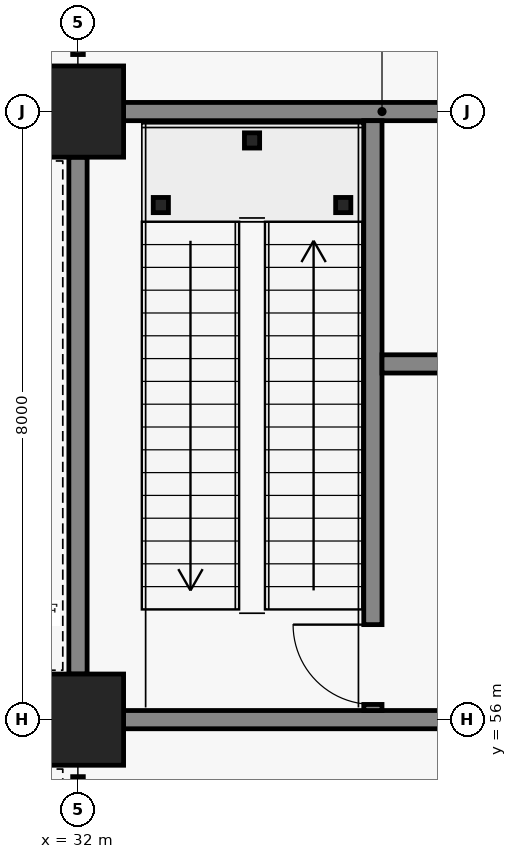
"""IFC4 building model, lengths in metres.
Left out: names, types, materials, properties, quantities, classifications, styles, units other than length and angle.
Written with IfcOpenShell. Run it as: python <this file> out.ifc"""

import sys

from ifc_helpers import new_model, si_unit, direction, frame, frame_2d, origin, origin_2d, place, context, subcontext, project, spatial, rectangle, hollow_rectangle, extrude, element, fill, save


model = new_model("IFC4")
c1 = context("Model", 3, precision=1e-05, world=origin(), true_north=direction((0.0, 1.0)))
c2 = subcontext(c1, "Body", "Model", "MODEL_VIEW")
j1 = project(units=[si_unit("LENGTHUNIT", "METRE"), si_unit("PLANEANGLEUNIT", "RADIAN")], contexts=[c1])
p1 = place(None, origin())
s1 = spatial("IfcSite", under=j1, at=p1, CompositionType="ELEMENT")
p2 = place(p1, origin())
s2 = spatial("IfcBuilding", under=s1, at=p2, CompositionType="ELEMENT")
p3 = place(p2, frame((0.0, 0.0, -5.4)))
s3 = spatial("IfcBuildingStorey", under=s2, at=p3, CompositionType="ELEMENT", Elevation=-5.4)
for number, where, z_axis, x_axis in (
    (1, (32.0, 56.0, 0.0), (0.0, 0.0, 1.0), (1.0, 0.0, 0.0)),
    (2, (32.0, 64.0, 0.0), (0.0, 0.0, 1.0), (1.0, 0.0, 0.0)),
):
    element("IfcColumn", number, at=place(p3, frame(where, z_axis=z_axis, x_axis=x_axis)), inside=s3, PredefinedType="COLUMN", context=c2, shape_type="SweptSolid", body=[
        extrude(rectangle(XDim=1.2, YDim=1.2, at=origin_2d()), origin(), (0.0, 0.0, 1.0), 5.4),
    ])
p4 = place(p3, frame((32.6, 56.0, 0.0), z_axis=(0.0, 0.0, 1.0), x_axis=(1.0, 0.0, 0.0)))
e3 = element("IfcWall", 3, at=p4, inside=s3, PredefinedType="SHEAR", context=c2, shape_type="SweptSolid", body=[
    extrude(rectangle(XDim=6.8, YDim=0.24, at=frame_2d((3.4, 0.0))), origin(), (0.0, 0.0, 1.0), 4.59),
])
p5 = place(p4, frame((4.65, 0.0, 0.0)))
e4 = element("IfcOpeningElement", 4, at=p5, cuts=e3, PredefinedType="OPENING", context=c2, shape_type="SweptSolid", body=[
    extrude(rectangle(XDim=1.1, YDim=2.2, at=frame_2d((0.55, 1.1))), frame((0.0, 0.13, 0.0), z_axis=(0.0, -1.0, 0.0), x_axis=(1.0, 0.0, 0.0)), (0.0, 0.0, 1.0), 0.26),
])
p6 = place(p3, frame((32.6, 64.0, 0.0), z_axis=(0.0, 0.0, 1.0), x_axis=(1.0, 0.0, 0.0)))
e5 = element("IfcWall", 5, at=p6, inside=s3, PredefinedType="SHEAR", context=c2, shape_type="SweptSolid", body=[
    extrude(rectangle(XDim=6.8, YDim=0.24, at=frame_2d((3.4, 0.0))), origin(), (0.0, 0.0, 1.0), 4.59),
])
p7 = place(p3, frame((32.0, 56.6, 0.0), z_axis=(0.0, 0.0, 1.0), x_axis=(0.0, 1.0, 0.0)))
e6 = element("IfcWall", 6, at=p7, inside=s3, PredefinedType="SHEAR", context=c2, shape_type="SweptSolid", body=[
    extrude(rectangle(XDim=6.8, YDim=0.24, at=frame_2d((3.4, 0.0))), origin(), (0.0, 0.0, 1.0), 4.39),
])
p8 = place(p3, frame((35.88, 56.12, 0.0), z_axis=(0.0, 0.0, 1.0), x_axis=(0.0, 1.0, 0.0)))
e7 = element("IfcWall", 7, at=p8, inside=s3, PredefinedType="SHEAR", context=c2, shape_type="SweptSolid", body=[
    extrude(rectangle(XDim=7.76, YDim=0.24, at=frame_2d((3.88, 0.0))), origin(), (0.0, 0.0, 1.0), 4.59),
])
p9 = place(p8, frame((0.08, 0.0, 0.0)))
e8 = element("IfcOpeningElement", 8, at=p9, cuts=e7, PredefinedType="OPENING", context=c2, shape_type="SweptSolid", body=[
    extrude(rectangle(XDim=1.05, YDim=2.15, at=frame_2d((0.525, 1.075))), frame((0.0, 0.13, 0.0), z_axis=(0.0, -1.0, 0.0), x_axis=(1.0, 0.0, 0.0)), (0.0, 0.0, 1.0), 0.26),
])
p10 = place(p3, frame((36.0, 60.68, 0.0), z_axis=(0.0, 0.0, 1.0), x_axis=(1.0, 0.0, 0.0)))
e9 = element("IfcWall", 9, at=p10, inside=s3, PredefinedType="SHEAR", context=c2, shape_type="SweptSolid", body=[
    extrude(rectangle(XDim=3.88, YDim=0.24, at=frame_2d((1.94, 0.0))), origin(), (0.0, 0.0, 1.0), 4.39),
])
p11 = place(p10, frame((1.0, 0.0, 0.0)))
e10 = element("IfcOpeningElement", 10, at=p11, cuts=e9, PredefinedType="OPENING", context=c2, shape_type="SweptSolid", body=[
    extrude(rectangle(XDim=1.1, YDim=2.15, at=frame_2d((0.55, 1.075))), frame((0.0, 0.13, 0.0), z_axis=(0.0, -1.0, 0.0), x_axis=(1.0, 0.0, 0.0)), (0.0, 0.0, 1.0), 0.26),
])
for number, where, z_axis, x_axis in (
    (11, (33.09, 62.77, 0.0), (0.0, 0.0, 1.0), (1.0, 0.0, 0.0)),
    (12, (35.49, 62.77, 0.0), (0.0, 0.0, 1.0), (1.0, 0.0, 0.0)),
    (13, (34.29, 63.62, 0.0), (0.0, 0.0, 1.0), (1.0, 0.0, 0.0)),
):
    element("IfcColumn", number, at=place(p3, frame(where, z_axis=z_axis, x_axis=x_axis)), inside=s3, PredefinedType="COLUMN", context=c2, shape_type="SweptSolid", body=[
        extrude(hollow_rectangle(XDim=0.2, YDim=0.2, WallThickness=0.009, at=origin_2d()), origin(), (0.0, 0.0, 1.0), 2.5),
    ])
p12 = place(p3, frame((32.0, 48.75, 0.0), z_axis=(0.0, 0.0, 1.0), x_axis=(0.0, 1.0, 0.0)))
e14 = element("IfcWall", 14, at=p12, inside=s3, PredefinedType="MOVABLE", context=c2, shape_type="SweptSolid", body=[
    extrude(rectangle(XDim=6.5, YDim=0.14, at=frame_2d((3.25, 0.0))), origin(), (0.0, 0.0, 1.0), 4.39),
])
p13 = place(p12, frame((2.775, 0.0, 0.0)))
e15 = element("IfcOpeningElement", 15, at=p13, cuts=e14, PredefinedType="OPENING", context=c2, shape_type="SweptSolid", body=[
    extrude(rectangle(XDim=0.95, YDim=2.1, at=frame_2d((0.475, 1.05))), frame((0.0, 0.08, 0.0), z_axis=(0.0, -1.0, 0.0), x_axis=(1.0, 0.0, 0.0)), (0.0, 0.0, 1.0), 0.16),
])
p14 = place(p3, frame((32.0, 64.75, 0.0), z_axis=(0.0, 0.0, 1.0), x_axis=(0.0, 1.0, 0.0)))
e16 = element("IfcWall", 16, at=p14, inside=s3, PredefinedType="MOVABLE", context=c2, shape_type="SweptSolid", body=[
    extrude(rectangle(XDim=6.5, YDim=0.14, at=frame_2d((3.25, 0.0))), origin(), (0.0, 0.0, 1.0), 4.39),
])
p15 = place(p14, frame((2.75, 0.0, 0.0)))
e17 = element("IfcOpeningElement", 17, at=p15, cuts=e16, PredefinedType="OPENING", context=c2, shape_type="SweptSolid", body=[
    extrude(rectangle(XDim=1.0, YDim=2.1, at=frame_2d((0.5, 1.05))), frame((0.0, 0.08, 0.0), z_axis=(0.0, -1.0, 0.0), x_axis=(1.0, 0.0, 0.0)), (0.0, 0.0, 1.0), 0.16),
])
p16 = place(p9, origin())
e18 = element("IfcDoor", 18, at=p16, inside=s3, OperationType="SINGLE_SWING_RIGHT", PredefinedType="DOOR", context=c2, shape_type="SweptSolid", body=[
    extrude(rectangle(XDim=1.05, YDim=2.15, at=frame_2d((0.525, 1.075))), frame((0.0, 0.025, 0.0), z_axis=(0.0, -1.0, 0.0), x_axis=(1.0, 0.0, 0.0)), (0.0, 0.0, 1.0), 0.05),
])
fill(e8, e18)
save(model, sys.argv[1])
